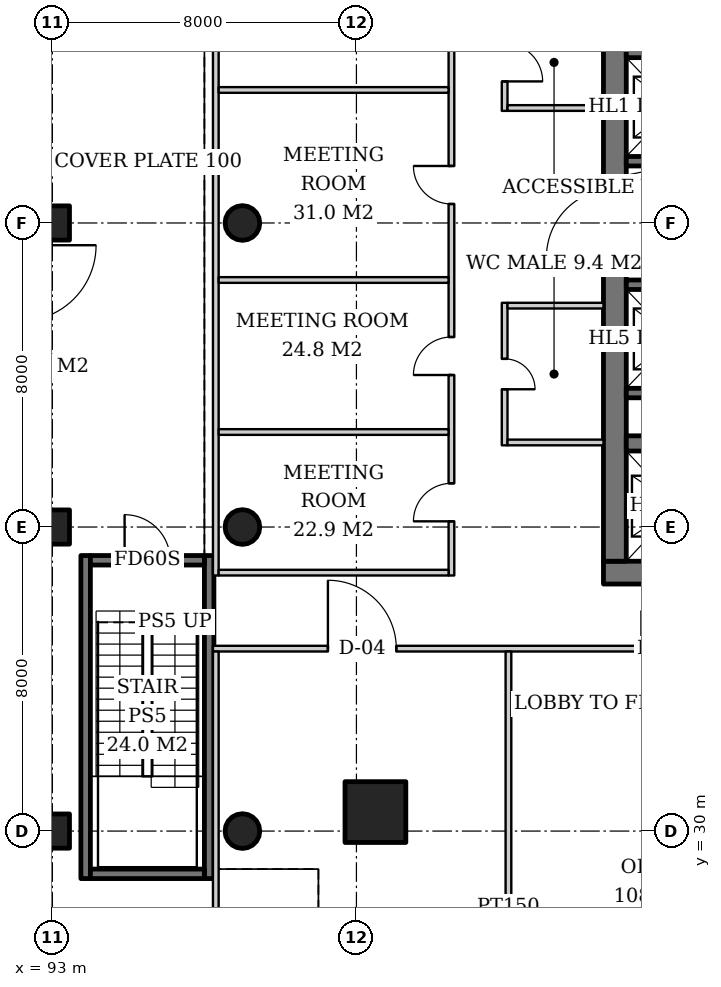
"""IFC4 building model, lengths in metres.
Left out: names, types, materials, properties, quantities, classifications, styles, units other than length and angle.
Written with IfcOpenShell. Run it as: python <this file> out.ifc"""

import sys

from ifc_helpers import new_model, si_unit, direction, frame, frame_2d, origin, origin_2d, place, context, subcontext, project, spatial, rectangle, hollow_circle, extrude, element, fill, save


model = new_model("IFC4")
c1 = context("Model", 3, precision=1e-05, world=origin(), true_north=direction((0.0, 1.0)))
c2 = subcontext(c1, "Body", "Model", "MODEL_VIEW")
j1 = project(units=[si_unit("LENGTHUNIT", "METRE"), si_unit("PLANEANGLEUNIT", "RADIAN")], contexts=[c1])
p1 = place(None, origin())
s1 = spatial("IfcSite", under=j1, at=p1, CompositionType="ELEMENT")
p2 = place(p1, origin())
s2 = spatial("IfcBuilding", under=s1, at=p2, CompositionType="ELEMENT")
p3 = place(p2, frame((0.0, 0.0, 11.0)))
s3 = spatial("IfcBuildingStorey", under=s2, at=p3, CompositionType="ELEMENT", Elevation=11.0)
for number, where, z_axis, x_axis in (
    (1, (93.0, 30.0, 0.0), (0.0, 0.0, 1.0), (1.0, 0.0, 0.0)),
    (2, (93.0, 38.0, 0.0), (0.0, 0.0, 1.0), (1.0, 0.0, 0.0)),
    (3, (93.0, 46.0, 0.0), (0.0, 0.0, 1.0), (1.0, 0.0, 0.0)),
):
    element("IfcColumn", number, at=place(p3, frame(where, z_axis=z_axis, x_axis=x_axis)), inside=s3, PredefinedType="COLUMN", context=c2, shape_type="SweptSolid", body=[
        extrude(rectangle(XDim=0.9, YDim=0.9, at=origin_2d()), origin(), (0.0, 0.0, 1.0), 5.0),
    ])
p4 = place(p3, frame((101.5, 30.5, 0.0), z_axis=(0.0, 0.0, 1.0), x_axis=(1.0, 0.0, 0.0)))
e4 = element("IfcColumn", 4, at=p4, inside=s3, PredefinedType="COLUMN", context=c2, shape_type="SweptSolid", body=[
    extrude(rectangle(XDim=1.6, YDim=1.6, at=origin_2d()), origin(), (0.0, 0.0, 1.0), 5.0),
])
for number, where, z_axis, x_axis in (
    (5, (98.0, 30.0, 0.0), (0.0, 0.0, 1.0), (1.0, 0.0, 0.0)),
    (6, (98.0, 46.0, 0.0), (0.0, 0.0, 1.0), (1.0, 0.0, 0.0)),
    (7, (98.0, 38.0, 0.0), (0.0, 0.0, 1.0), (1.0, 0.0, 0.0)),
):
    element("IfcColumn", number, at=place(p3, frame(where, z_axis=z_axis, x_axis=x_axis)), inside=s3, PredefinedType="COLUMN", context=c2, shape_type="SweptSolid", body=[
        extrude(hollow_circle(Radius=0.457, WallThickness=0.03, at=origin_2d()), origin(), (0.0, 0.0, 1.0), 5.0),
    ])
p5 = place(p3, frame((107.5, 36.8, 0.0), z_axis=(0.0, 0.0, 1.0), x_axis=(1.0, 0.0, 0.0)))
e8 = element("IfcWall", 8, at=p5, inside=s3, PredefinedType="SHEAR", context=c2, shape_type="SweptSolid", body=[
    extrude(rectangle(XDim=19.0, YDim=0.6, at=frame_2d((9.5, 0.0))), origin(), (0.0, 0.0, 1.0), 5.0),
])
p6 = place(p5, frame((3.9, 0.0, 0.0)))
e9 = element("IfcOpeningElement", 9, at=p6, cuts=e8, PredefinedType="OPENING", context=c2, shape_type="SweptSolid", body=[
    extrude(rectangle(XDim=1.0, YDim=2.1, at=frame_2d((0.5, 1.05))), frame((0.0, 0.31, 0.0), z_axis=(0.0, -1.0, 0.0), x_axis=(1.0, 0.0, 0.0)), (0.0, 0.0, 1.0), 0.62),
])
p7 = place(p5, frame((14.08, 0.0, 0.0)))
e10 = element("IfcOpeningElement", 10, at=p7, cuts=e8, PredefinedType="OPENING", context=c2, shape_type="SweptSolid", body=[
    extrude(rectangle(XDim=1.0, YDim=2.1, at=frame_2d((0.5, 1.05))), frame((0.0, 0.31, 0.0), z_axis=(0.0, -1.0, 0.0), x_axis=(1.0, 0.0, 0.0)), (0.0, 0.0, 1.0), 0.62),
])
p8 = place(p5, frame((15.615, 0.0, 0.0)))
e11 = element("IfcOpeningElement", 11, at=p8, cuts=e8, PredefinedType="OPENING", context=c2, shape_type="SweptSolid", body=[
    extrude(rectangle(XDim=1.0, YDim=2.1, at=frame_2d((0.5, 1.05))), frame((0.0, 0.31, 0.0), z_axis=(0.0, -1.0, 0.0), x_axis=(1.0, 0.0, 0.0)), (0.0, 0.0, 1.0), 0.62),
])
p9 = place(p5, frame((17.188, 0.0, 0.0)))
e12 = element("IfcOpeningElement", 12, at=p9, cuts=e8, PredefinedType="OPENING", context=c2, shape_type="SweptSolid", body=[
    extrude(rectangle(XDim=1.0, YDim=2.1, at=frame_2d((0.5, 1.05))), frame((0.0, 0.31, 0.0), z_axis=(0.0, -1.0, 0.0), x_axis=(1.0, 0.0, 0.0)), (0.0, 0.0, 1.0), 0.62),
])
p10 = place(p3, frame((107.8, 37.1, 0.0), z_axis=(0.0, 0.0, 1.0), x_axis=(0.0, 1.0, 0.0)))
e13 = element("IfcWall", 13, at=p10, inside=s3, PredefinedType="SHEAR", context=c2, shape_type="SweptSolid", body=[
    extrude(rectangle(XDim=17.8, YDim=0.6, at=frame_2d((8.9, 0.0))), origin(), (0.0, 0.0, 1.0), 5.0),
])
p11 = place(p10, frame((8.0, 0.0, 0.0)))
e14 = element("IfcOpeningElement", 14, at=p11, cuts=e13, PredefinedType="OPENING", context=c2, shape_type="SweptSolid", body=[
    extrude(rectangle(XDim=1.8, YDim=2.4, at=frame_2d((0.9, 1.2))), frame((0.0, 0.31, 0.0), z_axis=(0.0, -1.0, 0.0), x_axis=(1.0, 0.0, 0.0)), (0.0, 0.0, 1.0), 0.62),
])
p12 = place(p3, frame((108.1, 40.2, 0.0), z_axis=(0.0, 0.0, 1.0), x_axis=(1.0, 0.0, 0.0)))
e15 = element("IfcWall", 15, at=p12, inside=s3, PredefinedType="SHEAR", context=c2, shape_type="SweptSolid", body=[
    extrude(rectangle(XDim=17.8, YDim=0.4, at=frame_2d((8.9, 0.0))), origin(), (0.0, 0.0, 1.0), 5.0),
])
p13 = place(p3, frame((108.1, 50.475, 0.0), z_axis=(0.0, 0.0, 1.0), x_axis=(1.0, 0.0, 0.0)))
e16 = element("IfcWall", 16, at=p13, inside=s3, PredefinedType="SHEAR", context=c2, shape_type="SweptSolid", body=[
    extrude(rectangle(XDim=11.0, YDim=0.25, at=frame_2d((5.5, 0.0))), origin(), (0.0, 0.0, 1.0), 5.0),
])
p14 = place(p3, frame((108.1, 47.625, 0.0), z_axis=(0.0, 0.0, 1.0), x_axis=(1.0, 0.0, 0.0)))
e17 = element("IfcWall", 17, at=p14, inside=s3, PredefinedType="SHEAR", context=c2, shape_type="SweptSolid", body=[
    extrude(rectangle(XDim=12.83, YDim=0.25, at=frame_2d((6.415, 0.0))), origin(), (0.0, 0.0, 1.0), 5.0),
])
p15 = place(p14, frame((11.515, 0.0, 0.0)))
e18 = element("IfcOpeningElement", 18, at=p15, cuts=e17, PredefinedType="OPENING", context=c2, shape_type="SweptSolid", body=[
    extrude(rectangle(XDim=0.8, YDim=2.0, at=frame_2d((0.4, 1.0))), frame((0.0, 0.135, 0.0), z_axis=(0.0, -1.0, 0.0), x_axis=(1.0, 0.0, 0.0)), (0.0, 0.0, 1.0), 0.27),
])
p16 = place(p3, frame((108.1, 41.525, 0.0), z_axis=(0.0, 0.0, 1.0), x_axis=(1.0, 0.0, 0.0)))
e19 = element("IfcWall", 19, at=p16, inside=s3, PredefinedType="SHEAR", context=c2, shape_type="SweptSolid", body=[
    extrude(rectangle(XDim=11.0, YDim=0.25, at=frame_2d((5.5, 0.0))), origin(), (0.0, 0.0, 1.0), 5.0),
])
p17 = place(p3, frame((108.1, 44.375, 0.0), z_axis=(0.0, 0.0, 1.0), x_axis=(1.0, 0.0, 0.0)))
e20 = element("IfcWall", 20, at=p17, inside=s3, PredefinedType="SHEAR", context=c2, shape_type="SweptSolid", body=[
    extrude(rectangle(XDim=12.83, YDim=0.25, at=frame_2d((6.415, 0.0))), origin(), (0.0, 0.0, 1.0), 5.0),
])
p18 = place(p17, frame((9.0, 0.0, 0.0)))
e21 = element("IfcOpeningElement", 21, at=p18, cuts=e20, PredefinedType="OPENING", context=c2, shape_type="SweptSolid", body=[
    extrude(rectangle(XDim=1.0, YDim=2.1, at=frame_2d((0.5, 1.05))), frame((0.0, 0.135, 0.0), z_axis=(0.0, -1.0, 0.0), x_axis=(1.0, 0.0, 0.0)), (0.0, 0.0, 1.0), 0.27),
])
p19 = place(p17, frame((11.515, 0.0, 0.0)))
e22 = element("IfcOpeningElement", 22, at=p19, cuts=e20, PredefinedType="OPENING", context=c2, shape_type="SweptSolid", body=[
    extrude(rectangle(XDim=0.8, YDim=2.0, at=frame_2d((0.4, 1.0))), frame((0.0, 0.135, 0.0), z_axis=(0.0, -1.0, 0.0), x_axis=(1.0, 0.0, 0.0)), (0.0, 0.0, 1.0), 0.27),
])
for number, where, z_axis, x_axis in (
    (23, (93.875, 28.75, 0.0), (0.0, 0.0, 1.0), (0.0, 1.0, 0.0)),
    (24, (97.125, 28.75, 0.0), (0.0, 0.0, 1.0), (0.0, 1.0, 0.0)),
):
    element("IfcWall", number, at=place(p3, frame(where, z_axis=z_axis, x_axis=x_axis)), inside=s3, PredefinedType="SOLIDWALL", context=c2, shape_type="SweptSolid", body=[
        extrude(rectangle(XDim=8.5, YDim=0.25, at=frame_2d((4.25, 0.0))), origin(), (0.0, 0.0, 1.0), 4.7),
    ])
p20 = place(p3, frame((94.0, 28.875, 0.0), z_axis=(0.0, 0.0, 1.0), x_axis=(1.0, 0.0, 0.0)))
e25 = element("IfcWall", 25, at=p20, inside=s3, PredefinedType="SOLIDWALL", context=c2, shape_type="SweptSolid", body=[
    extrude(rectangle(XDim=3.0, YDim=0.25, at=frame_2d((1.5, 0.0))), origin(), (0.0, 0.0, 1.0), 4.7),
])
p21 = place(p3, frame((94.0, 37.125, 0.0), z_axis=(0.0, 0.0, 1.0), x_axis=(1.0, 0.0, 0.0)))
e26 = element("IfcWall", 26, at=p21, inside=s3, PredefinedType="SOLIDWALL", context=c2, shape_type="SweptSolid", body=[
    extrude(rectangle(XDim=3.0, YDim=0.25, at=frame_2d((1.5, 0.0))), origin(), (0.0, 0.0, 1.0), 4.7),
])
p22 = place(p21, frame((0.9, 0.0, 0.0)))
e27 = element("IfcOpeningElement", 27, at=p22, cuts=e26, PredefinedType="OPENING", context=c2, shape_type="SweptSolid", body=[
    extrude(rectangle(XDim=1.2, YDim=2.1, at=frame_2d((0.6, 1.05))), frame((0.0, 0.135, 0.0), z_axis=(0.0, -1.0, 0.0), x_axis=(1.0, 0.0, 0.0)), (0.0, 0.0, 1.0), 0.27),
])
p23 = place(p3, frame((104.9, 55.1, 0.0), z_axis=(0.0, 0.0, 1.0), x_axis=(0.0, -1.0, 0.0)))
e28 = element("IfcWall", 28, at=p23, inside=s3, PredefinedType="PARTITIONING", context=c2, shape_type="SweptSolid", body=[
    extrude(rectangle(XDim=6.15, YDim=0.15, at=frame_2d((3.075, 0.0))), origin(), (0.0, 0.0, 1.0), 3.9),
])
p24 = place(p23, frame((1.475, 0.0, 0.0)))
e29 = element("IfcOpeningElement", 29, at=p24, cuts=e28, PredefinedType="OPENING", context=c2, shape_type="SweptSolid", body=[
    extrude(rectangle(XDim=0.8, YDim=2.1, at=frame_2d((0.4, 1.05))), frame((0.0, 0.085, 0.0), z_axis=(0.0, -1.0, 0.0), x_axis=(1.0, 0.0, 0.0)), (0.0, 0.0, 1.0), 0.17),
])
p25 = place(p23, frame((4.375, 0.0, 0.0)))
e30 = element("IfcOpeningElement", 30, at=p25, cuts=e28, PredefinedType="OPENING", context=c2, shape_type="SweptSolid", body=[
    extrude(rectangle(XDim=1.0, YDim=2.1, at=frame_2d((0.5, 1.05))), frame((0.0, 0.085, 0.0), z_axis=(0.0, -1.0, 0.0), x_axis=(1.0, 0.0, 0.0)), (0.0, 0.0, 1.0), 0.17),
])
p26 = place(p3, frame((104.975, 49.025, 0.0), z_axis=(0.0, 0.0, 1.0), x_axis=(1.0, 0.0, 0.0)))
e31 = element("IfcWall", 31, at=p26, inside=s3, PredefinedType="PARTITIONING", context=c2, shape_type="SweptSolid", body=[
    extrude(rectangle(XDim=2.525, YDim=0.15, at=frame_2d((1.262, 0.0))), origin(), (0.0, 0.0, 1.0), 4.7),
])
p27 = place(p3, frame((104.9, 43.9, 0.0), z_axis=(0.0, 0.0, 1.0), x_axis=(0.0, -1.0, 0.0)))
e32 = element("IfcWall", 32, at=p27, inside=s3, PredefinedType="PARTITIONING", context=c2, shape_type="SweptSolid", body=[
    extrude(rectangle(XDim=3.75, YDim=0.15, at=frame_2d((1.875, 0.0))), origin(), (0.0, 0.0, 1.0), 3.947),
])
p28 = place(p27, frame((1.475, 0.0, 0.0)))
e33 = element("IfcOpeningElement", 33, at=p28, cuts=e32, PredefinedType="OPENING", context=c2, shape_type="SweptSolid", body=[
    extrude(rectangle(XDim=0.8, YDim=2.1, at=frame_2d((0.4, 1.05))), frame((0.0, 0.085, 0.0), z_axis=(0.0, -1.0, 0.0), x_axis=(1.0, 0.0, 0.0)), (0.0, 0.0, 1.0), 0.17),
])
for number, where, z_axis, x_axis in (
    (34, (104.975, 43.825, 0.0), (0.0, 0.0, 1.0), (1.0, 0.0, 0.0)),
    (35, (104.975, 40.225, 0.0), (0.0, 0.0, 1.0), (1.0, 0.0, 0.0)),
):
    element("IfcWall", number, at=place(p3, frame(where, z_axis=z_axis, x_axis=x_axis)), inside=s3, PredefinedType="PARTITIONING", context=c2, shape_type="SweptSolid", body=[
        extrude(rectangle(XDim=2.525, YDim=0.15, at=frame_2d((1.262, 0.0))), origin(), (0.0, 0.0, 1.0), 4.7),
    ])
p29 = place(p3, frame((97.225, 34.8, 0.0), z_axis=(0.0, 0.0, 1.0), x_axis=(1.0, 0.0, 0.0)))
e36 = element("IfcWall", 36, at=p29, inside=s3, PredefinedType="PARTITIONING", context=c2, shape_type="SweptSolid", body=[
    extrude(rectangle(XDim=39.55, YDim=0.15, at=frame_2d((19.775, 0.0))), origin(), (0.0, 0.0, 1.0), 3.9),
])
p30 = place(p29, frame((3.025, 0.0, 0.0)))
e37 = element("IfcOpeningElement", 37, at=p30, cuts=e36, PredefinedType="OPENING", context=c2, shape_type="SweptSolid", body=[
    extrude(rectangle(XDim=1.8, YDim=2.4, at=frame_2d((0.9, 1.2))), frame((0.0, 0.085, 0.0), z_axis=(0.0, -1.0, 0.0), x_axis=(1.0, 0.0, 0.0)), (0.0, 0.0, 1.0), 0.17),
])
p31 = place(p29, frame((11.275, 0.0, 0.0)))
e38 = element("IfcOpeningElement", 38, at=p31, cuts=e36, PredefinedType="OPENING", context=c2, shape_type="SweptSolid", body=[
    extrude(rectangle(XDim=1.0, YDim=2.1, at=frame_2d((0.5, 1.05))), frame((0.0, 0.085, 0.0), z_axis=(0.0, -1.0, 0.0), x_axis=(1.0, 0.0, 0.0)), (0.0, 0.0, 1.0), 0.17),
])
p32 = place(p29, frame((19.275, 0.0, 0.0)))
e39 = element("IfcOpeningElement", 39, at=p32, cuts=e36, PredefinedType="OPENING", context=c2, shape_type="SweptSolid", body=[
    extrude(rectangle(XDim=1.0, YDim=2.1, at=frame_2d((0.5, 1.05))), frame((0.0, 0.085, 0.0), z_axis=(0.0, -1.0, 0.0), x_axis=(1.0, 0.0, 0.0)), (0.0, 0.0, 1.0), 0.17),
])
p33 = place(p29, frame((27.275, 0.0, 0.0)))
e40 = element("IfcOpeningElement", 40, at=p33, cuts=e36, PredefinedType="OPENING", context=c2, shape_type="SweptSolid", body=[
    extrude(rectangle(XDim=1.0, YDim=2.1, at=frame_2d((0.5, 1.05))), frame((0.0, 0.085, 0.0), z_axis=(0.0, -1.0, 0.0), x_axis=(1.0, 0.0, 0.0)), (0.0, 0.0, 1.0), 0.17),
])
p34 = place(p29, frame((35.125, 0.0, 0.0)))
e41 = element("IfcOpeningElement", 41, at=p34, cuts=e36, PredefinedType="OPENING", context=c2, shape_type="SweptSolid", body=[
    extrude(rectangle(XDim=1.0, YDim=2.1, at=frame_2d((0.5, 1.05))), frame((0.0, 0.085, 0.0), z_axis=(0.0, -1.0, 0.0), x_axis=(1.0, 0.0, 0.0)), (0.0, 0.0, 1.0), 0.17),
])
p35 = place(p3, frame((97.3, 21.3, 0.0), z_axis=(0.0, 0.0, 1.0), x_axis=(0.0, 1.0, 0.0)))
e42 = element("IfcWall", 42, at=p35, inside=s3, PredefinedType="PARTITIONING", context=c2, shape_type="SweptSolid", body=[
    extrude(rectangle(XDim=13.425, YDim=0.15, at=frame_2d((6.712, 0.0))), origin(), (0.0, 0.0, 1.0), 4.7),
])
p36 = place(p3, frame((105.0, 21.3, 0.0), z_axis=(0.0, 0.0, 1.0), x_axis=(0.0, 1.0, 0.0)))
e43 = element("IfcWall", 43, at=p36, inside=s3, PredefinedType="PARTITIONING", context=c2, shape_type="SweptSolid", body=[
    extrude(rectangle(XDim=13.425, YDim=0.15, at=frame_2d((6.712, 0.0))), origin(), (0.0, 0.0, 1.0), 4.15),
])
p37 = place(p3, frame((97.3, 36.725, 0.0), z_axis=(0.0, 0.0, 1.0), x_axis=(0.0, 1.0, 0.0)))
e44 = element("IfcWall", 44, at=p37, inside=s3, PredefinedType="PARTITIONING", context=c2, shape_type="SweptSolid", body=[
    extrude(rectangle(XDim=20.475, YDim=0.15, at=frame_2d((10.237, 0.0))), origin(), (0.0, 0.0, 1.0), 4.7),
])
p38 = place(p3, frame((103.5, 36.725, 0.0), z_axis=(0.0, 0.0, 1.0), x_axis=(0.0, 1.0, 0.0)))
e45 = element("IfcWall", 45, at=p38, inside=s3, PredefinedType="PARTITIONING", context=c2, shape_type="SweptSolid", body=[
    extrude(rectangle(XDim=20.475, YDim=0.15, at=frame_2d((10.237, 0.0))), origin(), (0.0, 0.0, 1.0), 3.9),
])
p39 = place(p38, frame((1.425, 0.0, 0.0)))
e46 = element("IfcOpeningElement", 46, at=p39, cuts=e45, PredefinedType="OPENING", context=c2, shape_type="SweptSolid", body=[
    extrude(rectangle(XDim=1.0, YDim=2.1, at=frame_2d((0.5, 1.05))), frame((0.0, 0.085, 0.0), z_axis=(0.0, -1.0, 0.0), x_axis=(1.0, 0.0, 0.0)), (0.0, 0.0, 1.0), 0.17),
])
p40 = place(p38, frame((5.275, 0.0, 0.0)))
e47 = element("IfcOpeningElement", 47, at=p40, cuts=e45, PredefinedType="OPENING", context=c2, shape_type="SweptSolid", body=[
    extrude(rectangle(XDim=1.0, YDim=2.1, at=frame_2d((0.5, 1.05))), frame((0.0, 0.085, 0.0), z_axis=(0.0, -1.0, 0.0), x_axis=(1.0, 0.0, 0.0)), (0.0, 0.0, 1.0), 0.17),
])
p41 = place(p38, frame((9.775, 0.0, 0.0)))
e48 = element("IfcOpeningElement", 48, at=p41, cuts=e45, PredefinedType="OPENING", context=c2, shape_type="SweptSolid", body=[
    extrude(rectangle(XDim=1.0, YDim=2.1, at=frame_2d((0.5, 1.05))), frame((0.0, 0.085, 0.0), z_axis=(0.0, -1.0, 0.0), x_axis=(1.0, 0.0, 0.0)), (0.0, 0.0, 1.0), 0.17),
])
p42 = place(p38, frame((14.275, 0.0, 0.0)))
e49 = element("IfcOpeningElement", 49, at=p42, cuts=e45, PredefinedType="OPENING", context=c2, shape_type="SweptSolid", body=[
    extrude(rectangle(XDim=1.0, YDim=2.1, at=frame_2d((0.5, 1.05))), frame((0.0, 0.085, 0.0), z_axis=(0.0, -1.0, 0.0), x_axis=(1.0, 0.0, 0.0)), (0.0, 0.0, 1.0), 0.17),
])
p43 = place(p38, frame((18.125, 0.0, 0.0)))
e50 = element("IfcOpeningElement", 50, at=p43, cuts=e45, PredefinedType="OPENING", context=c2, shape_type="SweptSolid", body=[
    extrude(rectangle(XDim=1.0, YDim=2.1, at=frame_2d((0.5, 1.05))), frame((0.0, 0.085, 0.0), z_axis=(0.0, -1.0, 0.0), x_axis=(1.0, 0.0, 0.0)), (0.0, 0.0, 1.0), 0.17),
])
for number, where, z_axis, x_axis in (
    (51, (97.375, 36.8, 0.0), (0.0, 0.0, 1.0), (1.0, 0.0, 0.0)),
    (52, (97.375, 40.5, 0.0), (0.0, 0.0, 1.0), (1.0, 0.0, 0.0)),
    (53, (97.375, 44.5, 0.0), (0.0, 0.0, 1.0), (1.0, 0.0, 0.0)),
    (54, (97.375, 49.5, 0.0), (0.0, 0.0, 1.0), (1.0, 0.0, 0.0)),
):
    element("IfcWall", number, at=place(p3, frame(where, z_axis=z_axis, x_axis=x_axis)), inside=s3, PredefinedType="PARTITIONING", context=c2, shape_type="SweptSolid", body=[
        extrude(rectangle(XDim=6.05, YDim=0.15, at=frame_2d((3.025, 0.0))), origin(), (0.0, 0.0, 1.0), 4.15),
    ])
p44 = place(p11, origin())
e55 = element("IfcDoor", 55, at=p44, inside=s3, OperationType="DOUBLE_DOOR_SINGLE_SWING", PredefinedType="DOOR", context=c2, shape_type="SweptSolid", body=[
    extrude(rectangle(XDim=1.8, YDim=2.4, at=frame_2d((0.9, 1.2))), frame((0.0, 0.025, 0.0), z_axis=(0.0, -1.0, 0.0), x_axis=(1.0, 0.0, 0.0)), (0.0, 0.0, 1.0), 0.05),
])
fill(e14, e55)
p45 = place(p22, origin())
e56 = element("IfcDoor", 56, at=p45, inside=s3, OperationType="SINGLE_SWING_LEFT", PredefinedType="DOOR", context=c2, shape_type="SweptSolid", body=[
    extrude(rectangle(XDim=1.2, YDim=2.1, at=frame_2d((0.6, 1.05))), frame((0.0, 0.025, 0.0), z_axis=(0.0, -1.0, 0.0), x_axis=(1.0, 0.0, 0.0)), (0.0, 0.0, 1.0), 0.05),
])
fill(e27, e56)
p46 = place(p25, origin())
e57 = element("IfcDoor", 57, at=p46, inside=s3, OperationType="SINGLE_SWING_RIGHT", PredefinedType="DOOR", context=c2, shape_type="SweptSolid", body=[
    extrude(rectangle(XDim=1.0, YDim=2.1, at=frame_2d((0.5, 1.05))), frame((0.0, 0.025, 0.0), z_axis=(0.0, -1.0, 0.0), x_axis=(1.0, 0.0, 0.0)), (0.0, 0.0, 1.0), 0.05),
])
fill(e30, e57)
p47 = place(p28, origin())
e58 = element("IfcDoor", 58, at=p47, inside=s3, OperationType="SINGLE_SWING_RIGHT", PredefinedType="DOOR", context=c2, shape_type="SweptSolid", body=[
    extrude(rectangle(XDim=0.8, YDim=2.1, at=frame_2d((0.4, 1.05))), frame((0.0, 0.025, 0.0), z_axis=(0.0, -1.0, 0.0), x_axis=(1.0, 0.0, 0.0)), (0.0, 0.0, 1.0), 0.05),
])
fill(e33, e58)
p48 = place(p30, origin())
e59 = element("IfcDoor", 59, at=p48, inside=s3, OperationType="DOUBLE_DOOR_SINGLE_SWING", PredefinedType="DOOR", context=c2, shape_type="SweptSolid", body=[
    extrude(rectangle(XDim=1.8, YDim=2.4, at=frame_2d((0.9, 1.2))), frame((0.0, 0.025, 0.0), z_axis=(0.0, -1.0, 0.0), x_axis=(1.0, 0.0, 0.0)), (0.0, 0.0, 1.0), 0.05),
])
fill(e37, e59)
p49 = place(p39, origin())
e60 = element("IfcDoor", 60, at=p49, inside=s3, OperationType="SINGLE_SWING_LEFT", PredefinedType="DOOR", context=c2, shape_type="SweptSolid", body=[
    extrude(rectangle(XDim=1.0, YDim=2.1, at=frame_2d((0.5, 1.05))), frame((0.0, 0.025, 0.0), z_axis=(0.0, -1.0, 0.0), x_axis=(1.0, 0.0, 0.0)), (0.0, 0.0, 1.0), 0.05),
])
fill(e46, e60)
p50 = place(p40, origin())
e61 = element("IfcDoor", 61, at=p50, inside=s3, OperationType="SINGLE_SWING_LEFT", PredefinedType="DOOR", context=c2, shape_type="SweptSolid", body=[
    extrude(rectangle(XDim=1.0, YDim=2.1, at=frame_2d((0.5, 1.05))), frame((0.0, 0.025, 0.0), z_axis=(0.0, -1.0, 0.0), x_axis=(1.0, 0.0, 0.0)), (0.0, 0.0, 1.0), 0.05),
])
fill(e47, e61)
p51 = place(p41, origin())
e62 = element("IfcDoor", 62, at=p51, inside=s3, OperationType="SINGLE_SWING_RIGHT", PredefinedType="DOOR", context=c2, shape_type="SweptSolid", body=[
    extrude(rectangle(XDim=1.0, YDim=2.1, at=frame_2d((0.5, 1.05))), frame((0.0, 0.025, 0.0), z_axis=(0.0, -1.0, 0.0), x_axis=(1.0, 0.0, 0.0)), (0.0, 0.0, 1.0), 0.05),
])
fill(e48, e62)
save(model, sys.argv[1])
